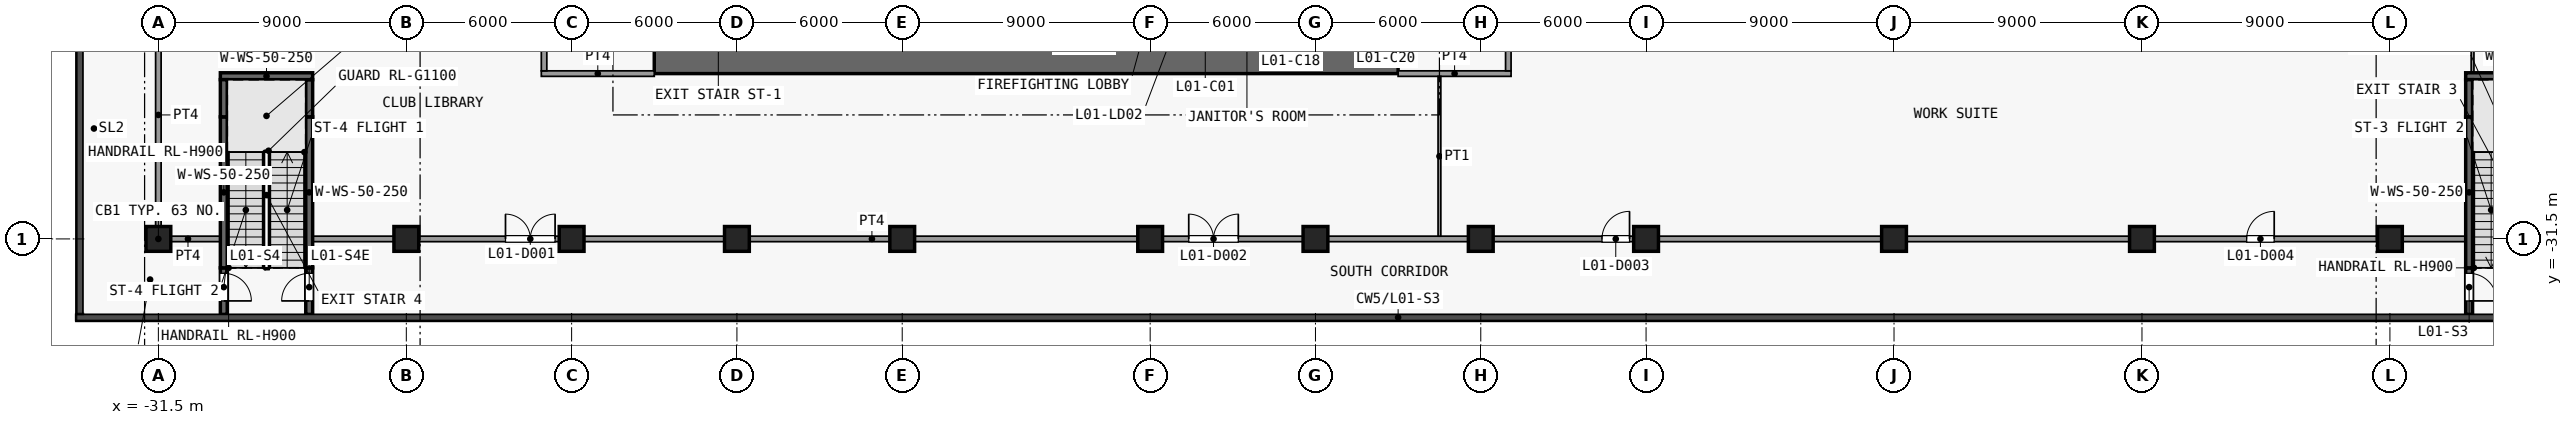
"""IFC4 building model, lengths in metres.
Left out: names, types, materials, properties, quantities, classifications, styles, units other than length and angle.
Written with IfcOpenShell. Run it as: python <this file> out.ifc"""

import sys

from ifc_helpers import new_model, si_unit, direction, frame, frame_2d, origin, origin_2d, place, context, subcontext, project, spatial, rectangle, extrude, element, fill, save


model = new_model("IFC4")
c1 = context("Model", 3, precision=1e-05, world=origin(), true_north=direction((0.0, 1.0)))
c2 = subcontext(c1, "Body", "Model", "MODEL_VIEW")
j1 = project(units=[si_unit("LENGTHUNIT", "METRE"), si_unit("PLANEANGLEUNIT", "RADIAN")], contexts=[c1])
p1 = place(None, origin())
s1 = spatial("IfcSite", under=j1, at=p1, CompositionType="ELEMENT")
p2 = place(p1, origin())
s2 = spatial("IfcBuilding", under=s1, at=p2, CompositionType="ELEMENT")
p3 = place(p2, frame((0.0, 0.0, 8.0)))
s3 = spatial("IfcBuildingStorey", under=s2, at=p3, CompositionType="ELEMENT", Elevation=8.0)
for number, where, z_axis, x_axis in (
    (1, (-31.5, -31.5, 0.0), (0.0, 0.0, 1.0), (1.0, 0.0, 0.0)),
    (2, (-22.5, -31.5, 0.0), (0.0, 0.0, 1.0), (1.0, 0.0, 0.0)),
    (3, (-16.5, -31.5, 0.0), (0.0, 0.0, 1.0), (1.0, 0.0, 0.0)),
    (4, (-10.5, -31.5, 0.0), (0.0, 0.0, 1.0), (1.0, 0.0, 0.0)),
    (5, (-4.5, -31.5, 0.0), (0.0, 0.0, 1.0), (1.0, 0.0, 0.0)),
    (6, (4.5, -31.5, 0.0), (0.0, 0.0, 1.0), (1.0, 0.0, 0.0)),
    (7, (10.5, -31.5, 0.0), (0.0, 0.0, 1.0), (1.0, 0.0, 0.0)),
    (8, (16.5, -31.5, 0.0), (0.0, 0.0, 1.0), (1.0, 0.0, 0.0)),
    (9, (22.5, -31.5, 0.0), (0.0, 0.0, 1.0), (1.0, 0.0, 0.0)),
    (10, (31.5, -31.5, 0.0), (0.0, 0.0, 1.0), (1.0, 0.0, 0.0)),
    (11, (40.5, -31.5, 0.0), (0.0, 0.0, 1.0), (1.0, 0.0, 0.0)),
    (12, (49.5, -31.5, 0.0), (0.0, 0.0, 1.0), (1.0, 0.0, 0.0)),
):
    element("IfcColumn", number, at=place(p3, frame(where, z_axis=z_axis, x_axis=x_axis)), inside=s3, PredefinedType="COLUMN", context=c2, shape_type="SweptSolid", body=[
        extrude(rectangle(XDim=0.9, YDim=0.9, at=origin_2d()), origin(), (0.0, 0.0, 1.0), 5.5),
    ])
p4 = place(p3, frame((-13.5, -25.05, 0.0), z_axis=(0.0, 0.0, 1.0), x_axis=(1.0, 0.0, 0.0)))
e13 = element("IfcWall", 13, at=p4, inside=s3, PredefinedType="SHEAR", context=c2, shape_type="SweptSolid", body=[
    extrude(rectangle(XDim=27.0, YDim=0.9, at=frame_2d((13.5, 0.0))), origin(), (0.0, 0.0, 1.0), 5.15),
])
p5 = place(p3, frame((52.375, -32.55, 0.0), z_axis=(0.0, 0.0, 1.0), x_axis=(0.0, -1.0, 0.0)))
e14 = element("IfcWall", 14, at=p5, inside=s3, PredefinedType="SHEAR", context=c2, shape_type="SweptSolid", body=[
    extrude(rectangle(XDim=1.69, YDim=0.25, at=frame_2d((0.845, 0.0))), origin(), (0.0, 0.0, 1.0), 5.15),
])
p6 = place(p5, frame((0.2, 0.0, 0.0)))
e15 = element("IfcOpeningElement", 15, at=p6, cuts=e14, PredefinedType="OPENING", context=c2, shape_type="SweptSolid", body=[
    extrude(rectangle(XDim=1.0, YDim=2.1, at=frame_2d((0.5, 1.05))), frame((0.0, 0.135, 0.0), z_axis=(0.0, -1.0, 0.0), x_axis=(1.0, 0.0, 0.0)), (0.0, 0.0, 1.0), 0.27),
])
p7 = place(p3, frame((52.375, -32.55, 0.0), z_axis=(0.0, 0.0, 1.0), x_axis=(0.0, 1.0, 0.0)))
e16 = element("IfcWall", 16, at=p7, inside=s3, PredefinedType="SHEAR", context=c2, shape_type="SweptSolid", body=[
    extrude(rectangle(XDim=5.48, YDim=0.25, at=frame_2d((2.74, 0.0))), origin(), (0.0, 0.0, 1.0), 5.15),
])
p8 = place(p3, frame((52.375, -27.07, 0.0), z_axis=(0.0, 0.0, 1.0), x_axis=(0.0, 1.0, 0.0)))
e17 = element("IfcWall", 17, at=p8, inside=s3, PredefinedType="SHEAR", context=c2, shape_type="SweptSolid", body=[
    extrude(rectangle(XDim=1.35, YDim=0.25, at=frame_2d((0.675, 0.0))), origin(), (0.0, 0.0, 1.0), 5.15),
])
p9 = place(p3, frame((52.25, -25.595, 0.0), z_axis=(0.0, 0.0, 1.0), x_axis=(1.0, 0.0, 0.0)))
e18 = element("IfcWall", 18, at=p9, inside=s3, PredefinedType="SHEAR", context=c2, shape_type="SweptSolid", body=[
    extrude(rectangle(XDim=3.35, YDim=0.25, at=frame_2d((1.675, 0.0))), origin(), (0.0, 0.0, 1.0), 5.15),
])
p10 = place(p3, frame((-29.125, -32.55, 0.0), z_axis=(0.0, 0.0, 1.0), x_axis=(0.0, -1.0, 0.0)))
e19 = element("IfcWall", 19, at=p10, inside=s3, PredefinedType="SHEAR", context=c2, shape_type="SweptSolid", body=[
    extrude(rectangle(XDim=1.69, YDim=0.25, at=frame_2d((0.845, 0.0))), origin(), (0.0, 0.0, 1.0), 5.15),
])
p11 = place(p10, frame((0.2, 0.0, 0.0)))
e20 = element("IfcOpeningElement", 20, at=p11, cuts=e19, PredefinedType="OPENING", context=c2, shape_type="SweptSolid", body=[
    extrude(rectangle(XDim=1.0, YDim=2.1, at=frame_2d((0.5, 1.05))), frame((0.0, 0.135, 0.0), z_axis=(0.0, -1.0, 0.0), x_axis=(1.0, 0.0, 0.0)), (0.0, 0.0, 1.0), 0.27),
])
p12 = place(p3, frame((-29.125, -32.55, 0.0), z_axis=(0.0, 0.0, 1.0), x_axis=(0.0, 1.0, 0.0)))
e21 = element("IfcWall", 21, at=p12, inside=s3, PredefinedType="SHEAR", context=c2, shape_type="SweptSolid", body=[
    extrude(rectangle(XDim=5.48, YDim=0.25, at=frame_2d((2.74, 0.0))), origin(), (0.0, 0.0, 1.0), 5.15),
])
p13 = place(p3, frame((-29.125, -27.07, 0.0), z_axis=(0.0, 0.0, 1.0), x_axis=(0.0, 1.0, 0.0)))
e22 = element("IfcWall", 22, at=p13, inside=s3, PredefinedType="SHEAR", context=c2, shape_type="SweptSolid", body=[
    extrude(rectangle(XDim=1.35, YDim=0.25, at=frame_2d((0.675, 0.0))), origin(), (0.0, 0.0, 1.0), 5.15),
])
p14 = place(p3, frame((-26.025, -34.24, 0.0), z_axis=(0.0, 0.0, 1.0), x_axis=(0.0, 1.0, 0.0)))
e23 = element("IfcWall", 23, at=p14, inside=s3, PredefinedType="SHEAR", context=c2, shape_type="SweptSolid", body=[
    extrude(rectangle(XDim=1.69, YDim=0.25, at=frame_2d((0.845, 0.0))), origin(), (0.0, 0.0, 1.0), 5.15),
])
p15 = place(p14, frame((0.49, 0.0, 0.0)))
e24 = element("IfcOpeningElement", 24, at=p15, cuts=e23, PredefinedType="OPENING", context=c2, shape_type="SweptSolid", body=[
    extrude(rectangle(XDim=1.0, YDim=2.1, at=frame_2d((0.5, 1.05))), frame((0.0, 0.135, 0.0), z_axis=(0.0, -1.0, 0.0), x_axis=(1.0, 0.0, 0.0)), (0.0, 0.0, 1.0), 0.27),
])
p16 = place(p3, frame((-26.025, -32.55, 0.0), z_axis=(0.0, 0.0, 1.0), x_axis=(0.0, 1.0, 0.0)))
e25 = element("IfcWall", 25, at=p16, inside=s3, PredefinedType="SHEAR", context=c2, shape_type="SweptSolid", body=[
    extrude(rectangle(XDim=5.48, YDim=0.25, at=frame_2d((2.74, 0.0))), origin(), (0.0, 0.0, 1.0), 5.15),
])
p17 = place(p3, frame((-26.025, -27.07, 0.0), z_axis=(0.0, 0.0, 1.0), x_axis=(0.0, 1.0, 0.0)))
e26 = element("IfcWall", 26, at=p17, inside=s3, PredefinedType="SHEAR", context=c2, shape_type="SweptSolid", body=[
    extrude(rectangle(XDim=1.35, YDim=0.25, at=frame_2d((0.675, 0.0))), origin(), (0.0, 0.0, 1.0), 5.15),
])
p18 = place(p3, frame((-29.25, -25.595, 0.0), z_axis=(0.0, 0.0, 1.0), x_axis=(1.0, 0.0, 0.0)))
e27 = element("IfcWall", 27, at=p18, inside=s3, PredefinedType="SHEAR", context=c2, shape_type="SweptSolid", body=[
    extrude(rectangle(XDim=3.35, YDim=0.25, at=frame_2d((1.675, 0.0))), origin(), (0.0, 0.0, 1.0), 5.15),
])
p19 = place(p3, frame((-31.6, -31.5, 0.0), z_axis=(0.0, 0.0, 1.0), x_axis=(1.0, 0.0, 0.0)))
e28 = element("IfcWall", 28, at=p19, inside=s3, PredefinedType="PARTITIONING", context=c2, shape_type="SweptSolid", body=[
    extrude(rectangle(XDim=2.35, YDim=0.2, at=frame_2d((1.175, 0.0))), origin(), (0.0, 0.0, 1.0), 5.15),
])
p20 = place(p3, frame((-25.9, -31.5, 0.0), z_axis=(0.0, 0.0, 1.0), x_axis=(1.0, 0.0, 0.0)))
e29 = element("IfcWall", 29, at=p20, inside=s3, PredefinedType="PARTITIONING", context=c2, shape_type="SweptSolid", body=[
    extrude(rectangle(XDim=78.15, YDim=0.2, at=frame_2d((39.075, 0.0))), origin(), (0.0, 0.0, 1.0), 5.15),
])
p21 = place(p20, frame((7.0, 0.0, 0.0)))
e30 = element("IfcOpeningElement", 30, at=p21, cuts=e29, PredefinedType="OPENING", context=c2, shape_type="SweptSolid", body=[
    extrude(rectangle(XDim=1.8, YDim=2.1, at=frame_2d((0.9, 1.05))), frame((0.0, 0.11, 0.0), z_axis=(0.0, -1.0, 0.0), x_axis=(1.0, 0.0, 0.0)), (0.0, 0.0, 1.0), 0.22),
])
p22 = place(p20, frame((31.8, 0.0, 0.0)))
e31 = element("IfcOpeningElement", 31, at=p22, cuts=e29, PredefinedType="OPENING", context=c2, shape_type="SweptSolid", body=[
    extrude(rectangle(XDim=1.8, YDim=2.1, at=frame_2d((0.9, 1.05))), frame((0.0, 0.11, 0.0), z_axis=(0.0, -1.0, 0.0), x_axis=(1.0, 0.0, 0.0)), (0.0, 0.0, 1.0), 0.22),
])
p23 = place(p20, frame((46.8, 0.0, 0.0)))
e32 = element("IfcOpeningElement", 32, at=p23, cuts=e29, PredefinedType="OPENING", context=c2, shape_type="SweptSolid", body=[
    extrude(rectangle(XDim=1.0, YDim=2.1, at=frame_2d((0.5, 1.05))), frame((0.0, 0.11, 0.0), z_axis=(0.0, -1.0, 0.0), x_axis=(1.0, 0.0, 0.0)), (0.0, 0.0, 1.0), 0.22),
])
p24 = place(p20, frame((70.2, 0.0, 0.0)))
e33 = element("IfcOpeningElement", 33, at=p24, cuts=e29, PredefinedType="OPENING", context=c2, shape_type="SweptSolid", body=[
    extrude(rectangle(XDim=1.0, YDim=2.1, at=frame_2d((0.5, 1.05))), frame((0.0, 0.11, 0.0), z_axis=(0.0, -1.0, 0.0), x_axis=(1.0, 0.0, 0.0)), (0.0, 0.0, 1.0), 0.22),
])
for number, where, z_axis, x_axis in (
    (34, (-17.6, -25.5, 0.0), (0.0, 0.0, 1.0), (1.0, 0.0, 0.0)),
    (35, (13.5, -25.5, 0.0), (0.0, 0.0, 1.0), (1.0, 0.0, 0.0)),
):
    element("IfcWall", number, at=place(p3, frame(where, z_axis=z_axis, x_axis=x_axis)), inside=s3, PredefinedType="PARTITIONING", context=c2, shape_type="SweptSolid", body=[
        extrude(rectangle(XDim=4.1, YDim=0.2, at=frame_2d((2.05, 0.0))), origin(), (0.0, 0.0, 1.0), 5.15),
    ])
p25 = place(p3, frame((-31.5, -31.4, 0.0), z_axis=(0.0, 0.0, 1.0), x_axis=(0.0, 1.0, 0.0)))
e36 = element("IfcWall", 36, at=p25, inside=s3, PredefinedType="PARTITIONING", context=c2, shape_type="SweptSolid", body=[
    extrude(rectangle(XDim=8.8, YDim=0.2, at=frame_2d((4.4, 0.0))), origin(), (0.0, 0.0, 1.0), 5.15),
])
p26 = place(p3, frame((-17.5, -25.4, 0.0), z_axis=(0.0, 0.0, 1.0), x_axis=(0.0, 1.0, 0.0)))
e37 = element("IfcWall", 37, at=p26, inside=s3, PredefinedType="PARTITIONING", context=c2, shape_type="SweptSolid", body=[
    extrude(rectangle(XDim=2.8, YDim=0.2, at=frame_2d((1.4, 0.0))), origin(), (0.0, 0.0, 1.0), 5.15),
])
p27 = place(p3, frame((15.0, -31.4, 0.0), z_axis=(0.0, 0.0, 1.0), x_axis=(0.0, 1.0, 0.0)))
e38 = element("IfcWall", 38, at=p27, inside=s3, PredefinedType="PARTITIONING", context=c2, shape_type="SweptSolid", body=[
    extrude(rectangle(XDim=5.8, YDim=0.1, at=frame_2d((2.9, 0.0))), origin(), (0.0, 0.0, 1.0), 5.15),
])
p28 = place(p3, frame((17.5, -25.4, 0.0), z_axis=(0.0, 0.0, 1.0), x_axis=(0.0, 1.0, 0.0)))
e39 = element("IfcWall", 39, at=p28, inside=s3, PredefinedType="PARTITIONING", context=c2, shape_type="SweptSolid", body=[
    extrude(rectangle(XDim=2.8, YDim=0.2, at=frame_2d((1.4, 0.0))), origin(), (0.0, 0.0, 1.0), 5.15),
])
p29 = place(p3, frame((52.5, -25.47, 0.0), z_axis=(0.0, 0.0, 1.0), x_axis=(0.0, 1.0, 0.0)))
e40 = element("IfcWall", 40, at=p29, inside=s3, PredefinedType="PARTITIONING", context=c2, shape_type="SweptSolid", body=[
    extrude(rectangle(XDim=8.97, YDim=0.1, at=frame_2d((4.485, 0.0))), origin(), (0.0, 0.0, 1.0), 5.15),
])
p30 = place(p6, origin())
e41 = element("IfcDoor", 41, at=p30, inside=s3, OperationType="SINGLE_SWING_RIGHT", PredefinedType="DOOR", context=c2, shape_type="SweptSolid", body=[
    extrude(rectangle(XDim=1.0, YDim=2.1, at=frame_2d((0.5, 1.05))), frame((0.0, 0.025, 0.0), z_axis=(0.0, -1.0, 0.0), x_axis=(1.0, 0.0, 0.0)), (0.0, 0.0, 1.0), 0.05),
])
fill(e15, e41)
p31 = place(p11, origin())
e42 = element("IfcDoor", 42, at=p31, inside=s3, OperationType="SINGLE_SWING_RIGHT", PredefinedType="DOOR", context=c2, shape_type="SweptSolid", body=[
    extrude(rectangle(XDim=1.0, YDim=2.1, at=frame_2d((0.5, 1.05))), frame((0.0, 0.025, 0.0), z_axis=(0.0, -1.0, 0.0), x_axis=(1.0, 0.0, 0.0)), (0.0, 0.0, 1.0), 0.05),
])
fill(e20, e42)
p32 = place(p15, origin())
e43 = element("IfcDoor", 43, at=p32, inside=s3, OperationType="SINGLE_SWING_LEFT", PredefinedType="DOOR", context=c2, shape_type="SweptSolid", body=[
    extrude(rectangle(XDim=1.0, YDim=2.1, at=frame_2d((0.5, 1.05))), frame((0.0, 0.025, 0.0), z_axis=(0.0, -1.0, 0.0), x_axis=(1.0, 0.0, 0.0)), (0.0, 0.0, 1.0), 0.05),
])
fill(e24, e43)
p33 = place(p21, origin())
e44 = element("IfcDoor", 44, at=p33, inside=s3, OperationType="DOUBLE_DOOR_SINGLE_SWING", PredefinedType="DOOR", context=c2, shape_type="SweptSolid", body=[
    extrude(rectangle(XDim=1.8, YDim=2.1, at=frame_2d((0.9, 1.05))), frame((0.0, 0.025, 0.0), z_axis=(0.0, -1.0, 0.0), x_axis=(1.0, 0.0, 0.0)), (0.0, 0.0, 1.0), 0.05),
])
fill(e30, e44)
p34 = place(p22, origin())
e45 = element("IfcDoor", 45, at=p34, inside=s3, OperationType="DOUBLE_DOOR_SINGLE_SWING", PredefinedType="DOOR", context=c2, shape_type="SweptSolid", body=[
    extrude(rectangle(XDim=1.8, YDim=2.1, at=frame_2d((0.9, 1.05))), frame((0.0, 0.025, 0.0), z_axis=(0.0, -1.0, 0.0), x_axis=(1.0, 0.0, 0.0)), (0.0, 0.0, 1.0), 0.05),
])
fill(e31, e45)
p35 = place(p23, origin())
e46 = element("IfcDoor", 46, at=p35, inside=s3, OperationType="SINGLE_SWING_LEFT", PredefinedType="DOOR", context=c2, shape_type="SweptSolid", body=[
    extrude(rectangle(XDim=1.0, YDim=2.1, at=frame_2d((0.5, 1.05))), frame((0.0, 0.025, 0.0), z_axis=(0.0, -1.0, 0.0), x_axis=(1.0, 0.0, 0.0)), (0.0, 0.0, 1.0), 0.05),
])
fill(e32, e46)
p36 = place(p24, origin())
e47 = element("IfcDoor", 47, at=p36, inside=s3, OperationType="SINGLE_SWING_LEFT", PredefinedType="DOOR", context=c2, shape_type="SweptSolid", body=[
    extrude(rectangle(XDim=1.0, YDim=2.1, at=frame_2d((0.5, 1.05))), frame((0.0, 0.025, 0.0), z_axis=(0.0, -1.0, 0.0), x_axis=(1.0, 0.0, 0.0)), (0.0, 0.0, 1.0), 0.05),
])
fill(e33, e47)
save(model, sys.argv[1])
